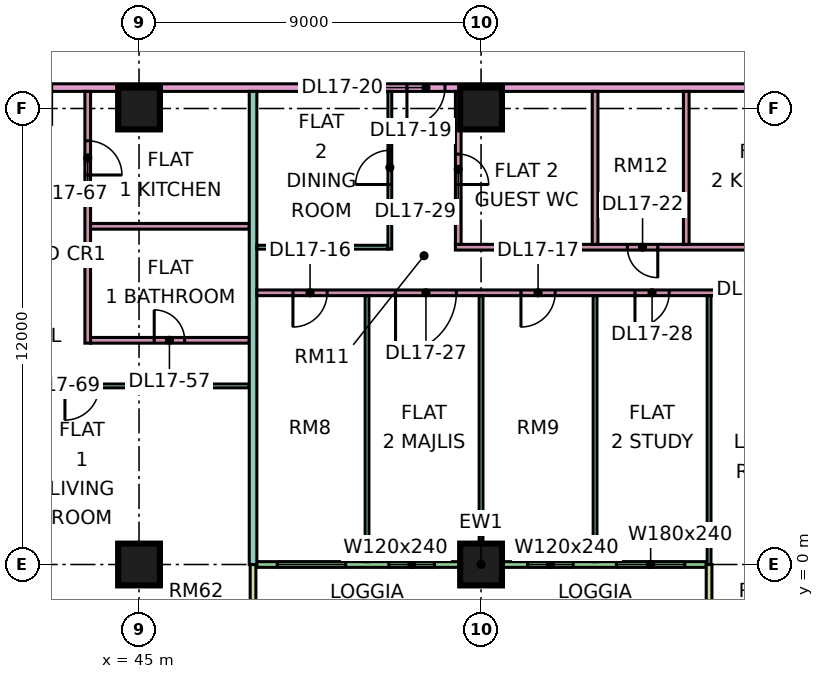
"""IFC4 building model, lengths in metres.
Left out: names, types, materials, properties, quantities, classifications, styles, units other than length and angle.
Written with IfcOpenShell. Run it as: python <this file> out.ifc"""

import sys

from ifc_helpers import new_model, si_unit, direction, frame, frame_2d, origin, origin_2d, place, context, subcontext, project, spatial, rectangle, extrude, element, fill, save


model = new_model("IFC4")
c1 = context("Model", 3, precision=1e-05, world=origin(), true_north=direction((0.0, 1.0)))
c2 = subcontext(c1, "Body", "Model", "MODEL_VIEW")
j1 = project(units=[si_unit("LENGTHUNIT", "METRE"), si_unit("PLANEANGLEUNIT", "RADIAN")], contexts=[c1])
p1 = place(None, origin())
s1 = spatial("IfcSite", under=j1, at=p1, CompositionType="ELEMENT")
p2 = place(p1, origin())
s2 = spatial("IfcBuilding", under=s1, at=p2, CompositionType="ELEMENT")
p3 = place(p2, frame((0.0, 0.0, 78.9)))
s3 = spatial("IfcBuildingStorey", under=s2, at=p3, CompositionType="ELEMENT", Elevation=78.9)
for number, where, z_axis, x_axis in (
    (1, (45.0, 0.0, 0.0), (0.0, 0.0, 1.0), (1.0, 0.0, 0.0)),
    (2, (45.0, 12.0, 0.0), (0.0, 0.0, 1.0), (1.0, 0.0, 0.0)),
    (3, (54.0, 0.0, 0.0), (0.0, 0.0, 1.0), (1.0, 0.0, 0.0)),
    (4, (54.0, 12.0, 0.0), (0.0, 0.0, 1.0), (1.0, 0.0, 0.0)),
):
    element("IfcColumn", number, at=place(p3, frame(where, z_axis=z_axis, x_axis=x_axis)), inside=s3, PredefinedType="COLUMN", context=c2, shape_type="SweptSolid", body=[
        extrude(rectangle(XDim=1.1, YDim=1.1, at=origin_2d()), origin(), (0.0, 0.0, 1.0), 3.75),
    ])
p4 = place(p3, frame((48.075, 0.0, 0.0), z_axis=(0.0, 0.0, 1.0), x_axis=(1.0, 0.0, 0.0)))
e5 = element("IfcWall", 5, at=p4, inside=s3, PredefinedType="SOLIDWALL", context=c2, shape_type="SweptSolid", body=[
    extrude(rectangle(XDim=11.85, YDim=0.15, at=frame_2d((5.925, 0.0))), origin(), (0.0, 0.0, 1.0), 3.35),
])
p5 = place(p4, frame((0.562, 0.0, 0.45)))
e6 = element("IfcOpeningElement", 6, at=p5, cuts=e5, PredefinedType="OPENING", context=c2, shape_type="SweptSolid", body=[
    extrude(rectangle(XDim=1.8, YDim=2.4, at=frame_2d((0.9, 1.2))), frame((0.0, 0.085, 0.0), z_axis=(0.0, -1.0, 0.0), x_axis=(1.0, 0.0, 0.0)), (0.0, 0.0, 1.0), 0.17),
])
p6 = place(p4, frame((3.5, 0.0, 0.45)))
e7 = element("IfcOpeningElement", 7, at=p6, cuts=e5, PredefinedType="OPENING", context=c2, shape_type="SweptSolid", body=[
    extrude(rectangle(XDim=1.2, YDim=2.4, at=frame_2d((0.6, 1.2))), frame((0.0, 0.085, 0.0), z_axis=(0.0, -1.0, 0.0), x_axis=(1.0, 0.0, 0.0)), (0.0, 0.0, 1.0), 0.17),
])
p7 = place(p4, frame((7.15, 0.0, 0.45)))
e8 = element("IfcOpeningElement", 8, at=p7, cuts=e5, PredefinedType="OPENING", context=c2, shape_type="SweptSolid", body=[
    extrude(rectangle(XDim=1.2, YDim=2.4, at=frame_2d((0.6, 1.2))), frame((0.0, 0.085, 0.0), z_axis=(0.0, -1.0, 0.0), x_axis=(1.0, 0.0, 0.0)), (0.0, 0.0, 1.0), 0.17),
])
p8 = place(p4, frame((9.488, 0.0, 0.45)))
e9 = element("IfcOpeningElement", 9, at=p8, cuts=e5, PredefinedType="OPENING", context=c2, shape_type="SweptSolid", body=[
    extrude(rectangle(XDim=1.8, YDim=2.4, at=frame_2d((0.9, 1.2))), frame((0.0, 0.085, 0.0), z_axis=(0.0, -1.0, 0.0), x_axis=(1.0, 0.0, 0.0)), (0.0, 0.0, 1.0), 0.17),
])
for number, where, z_axis, x_axis in (
    (10, (48.0, -1.5, 0.0), (0.0, 0.0, 1.0), (0.0, 1.0, 0.0)),
    (11, (60.0, -1.5, 0.0), (0.0, 0.0, 1.0), (0.0, 1.0, 0.0)),
):
    element("IfcWall", number, at=place(p3, frame(where, z_axis=z_axis, x_axis=x_axis)), inside=s3, PredefinedType="SOLIDWALL", context=c2, shape_type="SweptSolid", body=[
        extrude(rectangle(XDim=1.5, YDim=0.15, at=frame_2d((0.75, 0.0))), origin(), (0.0, 0.0, 1.0), 3.35),
    ])
p9 = place(p3, frame((33.05, 4.7, 0.0), z_axis=(0.0, 0.0, 1.0), x_axis=(1.0, 0.0, 0.0)))
e12 = element("IfcWall", 12, at=p9, inside=s3, PredefinedType="PARTITIONING", context=c2, shape_type="SweptSolid", body=[
    extrude(rectangle(XDim=14.85, YDim=0.1, at=frame_2d((7.425, 0.0))), origin(), (0.0, 0.0, 1.0), 3.35),
])
p10 = place(p9, frame((1.0, 0.0, 0.0)))
e13 = element("IfcOpeningElement", 13, at=p10, cuts=e12, PredefinedType="OPENING", context=c2, shape_type="SweptSolid", body=[
    extrude(rectangle(XDim=0.9, YDim=2.1, at=frame_2d((0.45, 1.05))), frame((0.0, 0.06, 0.0), z_axis=(0.0, -1.0, 0.0), x_axis=(1.0, 0.0, 0.0)), (0.0, 0.0, 1.0), 0.12),
])
p11 = place(p9, frame((4.0, 0.0, 0.0)))
e14 = element("IfcOpeningElement", 14, at=p11, cuts=e12, PredefinedType="OPENING", context=c2, shape_type="SweptSolid", body=[
    extrude(rectangle(XDim=0.9, YDim=2.1, at=frame_2d((0.45, 1.05))), frame((0.0, 0.06, 0.0), z_axis=(0.0, -1.0, 0.0), x_axis=(1.0, 0.0, 0.0)), (0.0, 0.0, 1.0), 0.12),
])
p12 = place(p9, frame((10.0, 0.0, 0.0)))
e15 = element("IfcOpeningElement", 15, at=p12, cuts=e12, PredefinedType="OPENING", context=c2, shape_type="SweptSolid", body=[
    extrude(rectangle(XDim=0.9, YDim=2.1, at=frame_2d((0.45, 1.05))), frame((0.0, 0.06, 0.0), z_axis=(0.0, -1.0, 0.0), x_axis=(1.0, 0.0, 0.0)), (0.0, 0.0, 1.0), 0.12),
])
p13 = place(p3, frame((40.65, 12.55, 0.0), z_axis=(0.0, 0.0, 1.0), x_axis=(1.0, 0.0, 0.0)))
e16 = element("IfcWall", 16, at=p13, inside=s3, PredefinedType="PARTITIONING", context=c2, shape_type="SweptSolid", body=[
    extrude(rectangle(XDim=28.125, YDim=0.2, at=frame_2d((14.062, 0.0))), origin(), (0.0, 0.0, 1.0), 3.35),
])
p14 = place(p13, frame((11.4, 0.0, 0.0)))
e17 = element("IfcOpeningElement", 17, at=p14, cuts=e16, PredefinedType="OPENING", context=c2, shape_type="SweptSolid", body=[
    extrude(rectangle(XDim=1.0, YDim=2.1, at=frame_2d((0.5, 1.05))), frame((0.0, 0.11, 0.0), z_axis=(0.0, -1.0, 0.0), x_axis=(1.0, 0.0, 0.0)), (0.0, 0.0, 1.0), 0.22),
])
p15 = place(p13, frame((1.05, 0.0, 0.0)))
e18 = element("IfcOpeningElement", 18, at=p15, cuts=e16, PredefinedType="OPENING", context=c2, shape_type="SweptSolid", body=[
    extrude(rectangle(XDim=1.0, YDim=2.1, at=frame_2d((0.5, 1.05))), frame((0.0, 0.11, 0.0), z_axis=(0.0, -1.0, 0.0), x_axis=(1.0, 0.0, 0.0)), (0.0, 0.0, 1.0), 0.22),
])
p16 = place(p3, frame((43.65, 5.825, 0.0), z_axis=(0.0, 0.0, 1.0), x_axis=(0.0, 1.0, 0.0)))
e19 = element("IfcWall", 19, at=p16, inside=s3, PredefinedType="PARTITIONING", context=c2, shape_type="SweptSolid", body=[
    extrude(rectangle(XDim=6.625, YDim=0.15, at=frame_2d((3.312, 0.0))), origin(), (0.0, 0.0, 1.0), 3.35),
])
p17 = place(p16, frame((4.425, 0.0, 0.0)))
e20 = element("IfcOpeningElement", 20, at=p17, cuts=e19, PredefinedType="OPENING", context=c2, shape_type="SweptSolid", body=[
    extrude(rectangle(XDim=0.9, YDim=2.1, at=frame_2d((0.45, 1.05))), frame((0.0, 0.085, 0.0), z_axis=(0.0, -1.0, 0.0), x_axis=(1.0, 0.0, 0.0)), (0.0, 0.0, 1.0), 0.17),
])
p18 = place(p3, frame((43.725, 5.9, 0.0), z_axis=(0.0, 0.0, 1.0), x_axis=(1.0, 0.0, 0.0)))
e21 = element("IfcWall", 21, at=p18, inside=s3, PredefinedType="PARTITIONING", context=c2, shape_type="SweptSolid", body=[
    extrude(rectangle(XDim=4.175, YDim=0.15, at=frame_2d((2.087, 0.0))), origin(), (0.0, 0.0, 1.0), 3.35),
])
p19 = place(p18, frame((1.675, 0.0, 0.0)))
e22 = element("IfcOpeningElement", 22, at=p19, cuts=e21, PredefinedType="OPENING", context=c2, shape_type="SweptSolid", body=[
    extrude(rectangle(XDim=0.8, YDim=2.1, at=frame_2d((0.4, 1.05))), frame((0.0, 0.085, 0.0), z_axis=(0.0, -1.0, 0.0), x_axis=(1.0, 0.0, 0.0)), (0.0, 0.0, 1.0), 0.17),
])
p20 = place(p3, frame((43.725, 8.9, 0.0), z_axis=(0.0, 0.0, 1.0), x_axis=(1.0, 0.0, 0.0)))
e23 = element("IfcWall", 23, at=p20, inside=s3, PredefinedType="PARTITIONING", context=c2, shape_type="SweptSolid", body=[
    extrude(rectangle(XDim=4.175, YDim=0.15, at=frame_2d((2.087, 0.0))), origin(), (0.0, 0.0, 1.0), 3.35),
])
p21 = place(p3, frame((48.0, 0.0, 0.0), z_axis=(0.0, 0.0, 1.0), x_axis=(0.0, 1.0, 0.0)))
e24 = element("IfcWall", 24, at=p21, inside=s3, PredefinedType="PARTITIONING", context=c2, shape_type="SweptSolid", body=[
    extrude(rectangle(XDim=12.45, YDim=0.2, at=frame_2d((6.225, 0.0))), origin(), (0.0, 0.0, 1.0), 3.35),
])
p22 = place(p3, frame((48.1, 7.15, 0.0), z_axis=(0.0, 0.0, 1.0), x_axis=(1.0, 0.0, 0.0)))
e25 = element("IfcWall", 25, at=p22, inside=s3, PredefinedType="PARTITIONING", context=c2, shape_type="SweptSolid", body=[
    extrude(rectangle(XDim=23.826, YDim=0.15, at=frame_2d((11.913, 0.0))), origin(), (0.0, 0.0, 1.0), 3.35),
])
p23 = place(p22, frame((0.95, 0.0, 0.0)))
e26 = element("IfcOpeningElement", 26, at=p23, cuts=e25, PredefinedType="OPENING", context=c2, shape_type="SweptSolid", body=[
    extrude(rectangle(XDim=0.9, YDim=2.1, at=frame_2d((0.45, 1.05))), frame((0.0, 0.085, 0.0), z_axis=(0.0, -1.0, 0.0), x_axis=(1.0, 0.0, 0.0)), (0.0, 0.0, 1.0), 0.17),
])
p24 = place(p22, frame((6.95, 0.0, 0.0)))
e27 = element("IfcOpeningElement", 27, at=p24, cuts=e25, PredefinedType="OPENING", context=c2, shape_type="SweptSolid", body=[
    extrude(rectangle(XDim=0.9, YDim=2.1, at=frame_2d((0.45, 1.05))), frame((0.0, 0.085, 0.0), z_axis=(0.0, -1.0, 0.0), x_axis=(1.0, 0.0, 0.0)), (0.0, 0.0, 1.0), 0.17),
])
p25 = place(p22, frame((21.95, 0.0, 0.0)))
e28 = element("IfcOpeningElement", 28, at=p25, cuts=e25, PredefinedType="OPENING", context=c2, shape_type="SweptSolid", body=[
    extrude(rectangle(XDim=0.9, YDim=2.1, at=frame_2d((0.45, 1.05))), frame((0.0, 0.085, 0.0), z_axis=(0.0, -1.0, 0.0), x_axis=(1.0, 0.0, 0.0)), (0.0, 0.0, 1.0), 0.17),
])
p26 = place(p22, frame((14.45, 0.0, 0.0)))
e29 = element("IfcOpeningElement", 29, at=p26, cuts=e25, PredefinedType="OPENING", context=c2, shape_type="SweptSolid", body=[
    extrude(rectangle(XDim=0.9, YDim=2.1, at=frame_2d((0.45, 1.05))), frame((0.0, 0.085, 0.0), z_axis=(0.0, -1.0, 0.0), x_axis=(1.0, 0.0, 0.0)), (0.0, 0.0, 1.0), 0.17),
])
p27 = place(p22, frame((19.8, 0.0, 0.0)))
e30 = element("IfcOpeningElement", 30, at=p27, cuts=e25, PredefinedType="OPENING", context=c2, shape_type="SweptSolid", body=[
    extrude(rectangle(XDim=0.8, YDim=2.1, at=frame_2d((0.4, 1.05))), frame((0.0, 0.085, 0.0), z_axis=(0.0, -1.0, 0.0), x_axis=(1.0, 0.0, 0.0)), (0.0, 0.0, 1.0), 0.17),
])
p28 = place(p22, frame((3.65, 0.0, 0.0)))
e31 = element("IfcOpeningElement", 31, at=p28, cuts=e25, PredefinedType="OPENING", context=c2, shape_type="SweptSolid", body=[
    extrude(rectangle(XDim=1.6, YDim=2.1, at=frame_2d((0.8, 1.05))), frame((0.0, 0.085, 0.0), z_axis=(0.0, -1.0, 0.0), x_axis=(1.0, 0.0, 0.0)), (0.0, 0.0, 1.0), 0.17),
])
p29 = place(p22, frame((9.95, 0.0, 0.0)))
e32 = element("IfcOpeningElement", 32, at=p29, cuts=e25, PredefinedType="OPENING", context=c2, shape_type="SweptSolid", body=[
    extrude(rectangle(XDim=0.9, YDim=2.1, at=frame_2d((0.45, 1.05))), frame((0.0, 0.085, 0.0), z_axis=(0.0, -1.0, 0.0), x_axis=(1.0, 0.0, 0.0)), (0.0, 0.0, 1.0), 0.17),
])
p30 = place(p3, frame((48.1, 8.35, 0.0), z_axis=(0.0, 0.0, 1.0), x_axis=(1.0, 0.0, 0.0)))
e33 = element("IfcWall", 33, at=p30, inside=s3, PredefinedType="PARTITIONING", context=c2, shape_type="SweptSolid", body=[
    extrude(rectangle(XDim=3.45, YDim=0.1, at=frame_2d((1.725, 0.0))), origin(), (0.0, 0.0, 1.0), 3.35),
])
p31 = place(p3, frame((51.0, 0.074, 0.0), z_axis=(0.0, 0.0, 1.0), x_axis=(0.0, 1.0, 0.0)))
e34 = element("IfcWall", 34, at=p31, inside=s3, PredefinedType="PARTITIONING", context=c2, shape_type="SweptSolid", body=[
    extrude(rectangle(XDim=7.001, YDim=0.1, at=frame_2d((3.5, 0.0))), origin(), (0.0, 0.0, 1.0), 3.35),
])
p32 = place(p3, frame((51.6, 8.3, 0.0), z_axis=(0.0, 0.0, 1.0), x_axis=(0.0, 1.0, 0.0)))
e35 = element("IfcWall", 35, at=p32, inside=s3, PredefinedType="PARTITIONING", context=c2, shape_type="SweptSolid", body=[
    extrude(rectangle(XDim=4.15, YDim=0.1, at=frame_2d((2.075, 0.0))), origin(), (0.0, 0.0, 1.0), 3.35),
])
p33 = place(p32, frame((1.7, 0.0, 0.0)))
e36 = element("IfcOpeningElement", 36, at=p33, cuts=e35, PredefinedType="OPENING", context=c2, shape_type="SweptSolid", body=[
    extrude(rectangle(XDim=0.9, YDim=2.1, at=frame_2d((0.45, 1.05))), frame((0.0, 0.06, 0.0), z_axis=(0.0, -1.0, 0.0), x_axis=(1.0, 0.0, 0.0)), (0.0, 0.0, 1.0), 0.12),
])
p34 = place(p3, frame((53.325, 8.35, 0.0), z_axis=(0.0, 0.0, 1.0), x_axis=(1.0, 0.0, 0.0)))
e37 = element("IfcWall", 37, at=p34, inside=s3, PredefinedType="PARTITIONING", context=c2, shape_type="SweptSolid", body=[
    extrude(rectangle(XDim=15.45, YDim=0.15, at=frame_2d((7.725, 0.0))), origin(), (0.0, 0.0, 1.0), 3.35),
])
p35 = place(p34, frame((13.275, 0.0, 0.0)))
e38 = element("IfcOpeningElement", 38, at=p35, cuts=e37, PredefinedType="OPENING", context=c2, shape_type="SweptSolid", body=[
    extrude(rectangle(XDim=0.8, YDim=2.1, at=frame_2d((0.4, 1.05))), frame((0.0, 0.085, 0.0), z_axis=(0.0, -1.0, 0.0), x_axis=(1.0, 0.0, 0.0)), (0.0, 0.0, 1.0), 0.17),
])
p36 = place(p34, frame((8.625, 0.0, 0.0)))
e39 = element("IfcOpeningElement", 39, at=p36, cuts=e37, PredefinedType="OPENING", context=c2, shape_type="SweptSolid", body=[
    extrude(rectangle(XDim=0.9, YDim=2.1, at=frame_2d((0.45, 1.05))), frame((0.0, 0.085, 0.0), z_axis=(0.0, -1.0, 0.0), x_axis=(1.0, 0.0, 0.0)), (0.0, 0.0, 1.0), 0.17),
])
p37 = place(p34, frame((4.525, 0.0, 0.0)))
e40 = element("IfcOpeningElement", 40, at=p37, cuts=e37, PredefinedType="OPENING", context=c2, shape_type="SweptSolid", body=[
    extrude(rectangle(XDim=0.8, YDim=2.1, at=frame_2d((0.4, 1.05))), frame((0.0, 0.085, 0.0), z_axis=(0.0, -1.0, 0.0), x_axis=(1.0, 0.0, 0.0)), (0.0, 0.0, 1.0), 0.17),
])
p38 = place(p3, frame((53.4, 8.425, 0.0), z_axis=(0.0, 0.0, 1.0), x_axis=(0.0, 1.0, 0.0)))
e41 = element("IfcWall", 41, at=p38, inside=s3, PredefinedType="PARTITIONING", context=c2, shape_type="SweptSolid", body=[
    extrude(rectangle(XDim=4.025, YDim=0.15, at=frame_2d((2.012, 0.0))), origin(), (0.0, 0.0, 1.0), 3.35),
])
p39 = place(p38, frame((1.575, 0.0, 0.0)))
e42 = element("IfcOpeningElement", 42, at=p39, cuts=e41, PredefinedType="OPENING", context=c2, shape_type="SweptSolid", body=[
    extrude(rectangle(XDim=0.8, YDim=2.1, at=frame_2d((0.4, 1.05))), frame((0.0, 0.085, 0.0), z_axis=(0.0, -1.0, 0.0), x_axis=(1.0, 0.0, 0.0)), (0.0, 0.0, 1.0), 0.17),
])
for number, where, z_axis, x_axis in (
    (43, (54.0, 0.074, 0.0), (0.0, 0.0, 1.0), (0.0, 1.0, 0.0)),
    (44, (57.0, 0.074, 0.0), (0.0, 0.0, 1.0), (0.0, 1.0, 0.0)),
):
    element("IfcWall", number, at=place(p3, frame(where, z_axis=z_axis, x_axis=x_axis)), inside=s3, PredefinedType="PARTITIONING", context=c2, shape_type="SweptSolid", body=[
        extrude(rectangle(XDim=7.001, YDim=0.1, at=frame_2d((3.5, 0.0))), origin(), (0.0, 0.0, 1.0), 3.35),
    ])
for number, where, z_axis, x_axis in (
    (45, (57.0, 8.425, 0.0), (0.0, 0.0, 1.0), (0.0, 1.0, 0.0)),
    (46, (59.4, 8.425, 0.0), (0.0, 0.0, 1.0), (0.0, 1.0, 0.0)),
):
    element("IfcWall", number, at=place(p3, frame(where, z_axis=z_axis, x_axis=x_axis)), inside=s3, PredefinedType="PARTITIONING", context=c2, shape_type="SweptSolid", body=[
        extrude(rectangle(XDim=4.025, YDim=0.15, at=frame_2d((2.012, 0.0))), origin(), (0.0, 0.0, 1.0), 3.35),
    ])
p40 = place(p3, frame((60.0, 0.0, 0.0), z_axis=(0.0, 0.0, 1.0), x_axis=(0.0, 1.0, 0.0)))
e47 = element("IfcWall", 47, at=p40, inside=s3, PredefinedType="PARTITIONING", context=c2, shape_type="SweptSolid", body=[
    extrude(rectangle(XDim=7.075, YDim=0.1, at=frame_2d((3.538, 0.0))), origin(), (0.0, 0.0, 1.0), 3.35),
])
p41 = place(p5, origin())
e48 = element("IfcWindow", 48, at=p41, inside=s3, PartitioningType="SINGLE_PANEL", PredefinedType="WINDOW", context=c2, shape_type="SweptSolid", body=[
    extrude(rectangle(XDim=1.8, YDim=2.4, at=frame_2d((0.9, 1.2))), frame((0.0, 0.03, 0.0), z_axis=(0.0, -1.0, 0.0), x_axis=(1.0, 0.0, 0.0)), (0.0, 0.0, 1.0), 0.06),
])
fill(e6, e48)
p42 = place(p6, origin())
e49 = element("IfcWindow", 49, at=p42, inside=s3, PartitioningType="SINGLE_PANEL", PredefinedType="WINDOW", context=c2, shape_type="SweptSolid", body=[
    extrude(rectangle(XDim=1.2, YDim=2.4, at=frame_2d((0.6, 1.2))), frame((0.0, 0.03, 0.0), z_axis=(0.0, -1.0, 0.0), x_axis=(1.0, 0.0, 0.0)), (0.0, 0.0, 1.0), 0.06),
])
fill(e7, e49)
p43 = place(p7, origin())
e50 = element("IfcWindow", 50, at=p43, inside=s3, PartitioningType="SINGLE_PANEL", PredefinedType="WINDOW", context=c2, shape_type="SweptSolid", body=[
    extrude(rectangle(XDim=1.2, YDim=2.4, at=frame_2d((0.6, 1.2))), frame((0.0, 0.03, 0.0), z_axis=(0.0, -1.0, 0.0), x_axis=(1.0, 0.0, 0.0)), (0.0, 0.0, 1.0), 0.06),
])
fill(e8, e50)
p44 = place(p8, origin())
e51 = element("IfcWindow", 51, at=p44, inside=s3, PartitioningType="SINGLE_PANEL", PredefinedType="WINDOW", context=c2, shape_type="SweptSolid", body=[
    extrude(rectangle(XDim=1.8, YDim=2.4, at=frame_2d((0.9, 1.2))), frame((0.0, 0.03, 0.0), z_axis=(0.0, -1.0, 0.0), x_axis=(1.0, 0.0, 0.0)), (0.0, 0.0, 1.0), 0.06),
])
fill(e9, e51)
p45 = place(p23, frame((0.9, 0.0, 0.0), z_axis=(0.0, 0.0, 1.0), x_axis=(-1.0, 0.0, 0.0)))
e52 = element("IfcDoor", 52, at=p45, inside=s3, OperationType="SINGLE_SWING_LEFT", PredefinedType="DOOR", context=c2, shape_type="SweptSolid", body=[
    extrude(rectangle(XDim=0.9, YDim=2.1, at=frame_2d((0.45, 1.05))), frame((0.0, 0.025, 0.0), z_axis=(0.0, -1.0, 0.0), x_axis=(1.0, 0.0, 0.0)), (0.0, 0.0, 1.0), 0.05),
])
fill(e26, e52)
p46 = place(p24, frame((0.9, 0.0, 0.0), z_axis=(0.0, 0.0, 1.0), x_axis=(-1.0, 0.0, 0.0)))
e53 = element("IfcDoor", 53, at=p46, inside=s3, OperationType="SINGLE_SWING_LEFT", PredefinedType="DOOR", context=c2, shape_type="SweptSolid", body=[
    extrude(rectangle(XDim=0.9, YDim=2.1, at=frame_2d((0.45, 1.05))), frame((0.0, 0.025, 0.0), z_axis=(0.0, -1.0, 0.0), x_axis=(1.0, 0.0, 0.0)), (0.0, 0.0, 1.0), 0.05),
])
fill(e27, e53)
p47 = place(p33, origin())
e54 = element("IfcDoor", 54, at=p47, inside=s3, OperationType="SINGLE_SWING_LEFT", PredefinedType="DOOR", context=c2, shape_type="SweptSolid", body=[
    extrude(rectangle(XDim=0.9, YDim=2.1, at=frame_2d((0.45, 1.05))), frame((0.0, 0.025, 0.0), z_axis=(0.0, -1.0, 0.0), x_axis=(1.0, 0.0, 0.0)), (0.0, 0.0, 1.0), 0.05),
])
fill(e36, e54)
p48 = place(p14, frame((1.0, 0.0, 0.0), z_axis=(0.0, 0.0, 1.0), x_axis=(-1.0, 0.0, 0.0)))
e55 = element("IfcDoor", 55, at=p48, inside=s3, OperationType="SINGLE_SWING_LEFT", PredefinedType="DOOR", context=c2, shape_type="SweptSolid", body=[
    extrude(rectangle(XDim=1.0, YDim=2.1, at=frame_2d((0.5, 1.05))), frame((0.0, 0.025, 0.0), z_axis=(0.0, -1.0, 0.0), x_axis=(1.0, 0.0, 0.0)), (0.0, 0.0, 1.0), 0.05),
])
fill(e17, e55)
p49 = place(p37, origin())
e56 = element("IfcDoor", 56, at=p49, inside=s3, OperationType="SINGLE_SWING_RIGHT", PredefinedType="DOOR", context=c2, shape_type="SweptSolid", body=[
    extrude(rectangle(XDim=0.8, YDim=2.1, at=frame_2d((0.4, 1.05))), frame((0.0, 0.025, 0.0), z_axis=(0.0, -1.0, 0.0), x_axis=(1.0, 0.0, 0.0)), (0.0, 0.0, 1.0), 0.05),
])
fill(e40, e56)
p50 = place(p28, frame((1.6, 0.0, 0.0), z_axis=(0.0, 0.0, 1.0), x_axis=(-1.0, 0.0, 0.0)))
e57 = element("IfcDoor", 57, at=p50, inside=s3, OperationType="DOUBLE_DOOR_SINGLE_SWING", PredefinedType="DOOR", context=c2, shape_type="SweptSolid", body=[
    extrude(rectangle(XDim=1.6, YDim=2.1, at=frame_2d((0.8, 1.05))), frame((0.0, 0.025, 0.0), z_axis=(0.0, -1.0, 0.0), x_axis=(1.0, 0.0, 0.0)), (0.0, 0.0, 1.0), 0.05),
])
fill(e31, e57)
p51 = place(p29, frame((0.9, 0.0, 0.0), z_axis=(0.0, 0.0, 1.0), x_axis=(-1.0, 0.0, 0.0)))
e58 = element("IfcDoor", 58, at=p51, inside=s3, OperationType="SINGLE_SWING_LEFT", PredefinedType="DOOR", context=c2, shape_type="SweptSolid", body=[
    extrude(rectangle(XDim=0.9, YDim=2.1, at=frame_2d((0.45, 1.05))), frame((0.0, 0.025, 0.0), z_axis=(0.0, -1.0, 0.0), x_axis=(1.0, 0.0, 0.0)), (0.0, 0.0, 1.0), 0.05),
])
fill(e32, e58)
p52 = place(p39, frame((0.8, 0.0, 0.0), z_axis=(0.0, 0.0, 1.0), x_axis=(-1.0, 0.0, 0.0)))
e59 = element("IfcDoor", 59, at=p52, inside=s3, OperationType="SINGLE_SWING_LEFT", PredefinedType="DOOR", context=c2, shape_type="SweptSolid", body=[
    extrude(rectangle(XDim=0.8, YDim=2.1, at=frame_2d((0.4, 1.05))), frame((0.0, 0.025, 0.0), z_axis=(0.0, -1.0, 0.0), x_axis=(1.0, 0.0, 0.0)), (0.0, 0.0, 1.0), 0.05),
])
fill(e42, e59)
p53 = place(p19, origin())
e60 = element("IfcDoor", 60, at=p53, inside=s3, OperationType="SINGLE_SWING_LEFT", PredefinedType="DOOR", context=c2, shape_type="SweptSolid", body=[
    extrude(rectangle(XDim=0.8, YDim=2.1, at=frame_2d((0.4, 1.05))), frame((0.0, 0.025, 0.0), z_axis=(0.0, -1.0, 0.0), x_axis=(1.0, 0.0, 0.0)), (0.0, 0.0, 1.0), 0.05),
])
fill(e22, e60)
p54 = place(p17, frame((0.9, 0.0, 0.0), z_axis=(0.0, 0.0, 1.0), x_axis=(-1.0, 0.0, 0.0)))
e61 = element("IfcDoor", 61, at=p54, inside=s3, OperationType="SINGLE_SWING_LEFT", PredefinedType="DOOR", context=c2, shape_type="SweptSolid", body=[
    extrude(rectangle(XDim=0.9, YDim=2.1, at=frame_2d((0.45, 1.05))), frame((0.0, 0.025, 0.0), z_axis=(0.0, -1.0, 0.0), x_axis=(1.0, 0.0, 0.0)), (0.0, 0.0, 1.0), 0.05),
])
fill(e20, e61)
p55 = place(p12, frame((0.9, 0.0, 0.0), z_axis=(0.0, 0.0, 1.0), x_axis=(-1.0, 0.0, 0.0)))
e62 = element("IfcDoor", 62, at=p55, inside=s3, OperationType="SINGLE_SWING_LEFT", PredefinedType="DOOR", context=c2, shape_type="SweptSolid", body=[
    extrude(rectangle(XDim=0.9, YDim=2.1, at=frame_2d((0.45, 1.05))), frame((0.0, 0.025, 0.0), z_axis=(0.0, -1.0, 0.0), x_axis=(1.0, 0.0, 0.0)), (0.0, 0.0, 1.0), 0.05),
])
fill(e15, e62)
save(model, sys.argv[1])
